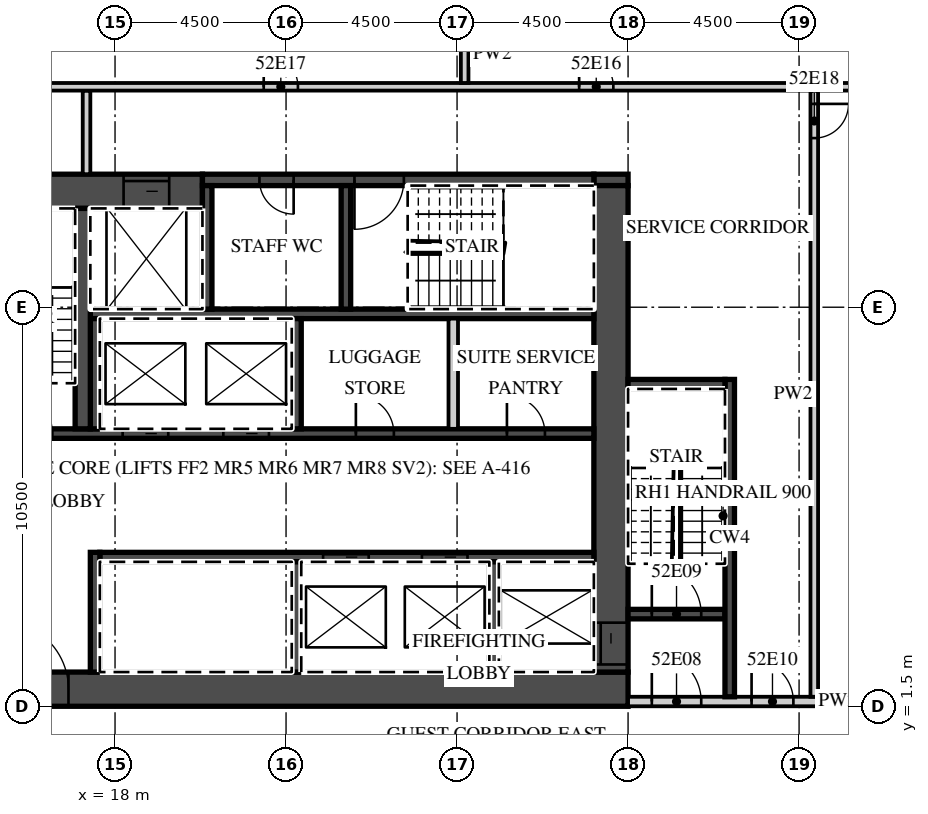
"""IFC4 building model, lengths in metres.
Left out: names, types, materials, properties, quantities, classifications, styles, units other than length and angle.
Written with IfcOpenShell. Run it as: python <this file> out.ifc"""

import sys

from ifc_helpers import new_model, si_unit, direction, frame, frame_2d, origin, place, context, subcontext, project, spatial, rectangle, extrude, element, fill, save


model = new_model("IFC4")
c1 = context("Model", 3, precision=1e-05, world=origin(), true_north=direction((0.0, 1.0)))
c2 = subcontext(c1, "Body", "Model", "MODEL_VIEW")
j1 = project(units=[si_unit("LENGTHUNIT", "METRE"), si_unit("PLANEANGLEUNIT", "RADIAN")], contexts=[c1])
p1 = place(None, origin())
s1 = spatial("IfcSite", under=j1, at=p1, CompositionType="ELEMENT")
p2 = place(p1, origin())
s2 = spatial("IfcBuilding", under=s1, at=p2, CompositionType="ELEMENT")
p3 = place(p2, frame((0.0, 0.0, 217.7)))
s3 = spatial("IfcBuildingStorey", under=s2, at=p3, CompositionType="ELEMENT", Elevation=217.7)
p4 = place(p3, frame((13.5, 1.95, 0.0), z_axis=(0.0, 0.0, 1.0), x_axis=(1.0, 0.0, 0.0)))
e1 = element("IfcWall", 1, at=p4, inside=s3, PredefinedType="SHEAR", context=c2, shape_type="SweptSolid", body=[
    extrude(rectangle(XDim=18.0, YDim=0.9, at=frame_2d((9.0, 0.0))), origin(), (0.0, 0.0, 1.0), 3.02),
])
p5 = place(p4, frame((1.475, 0.0, 0.0)))
e2 = element("IfcOpeningElement", 2, at=p5, cuts=e1, PredefinedType="OPENING", context=c2, shape_type="SweptSolid", body=[
    extrude(rectangle(XDim=1.8, YDim=2.1, at=frame_2d((0.9, 1.05))), frame((0.0, 0.46, 0.0), z_axis=(0.0, -1.0, 0.0), x_axis=(1.0, 0.0, 0.0)), (0.0, 0.0, 1.0), 0.92),
])
p6 = place(p3, frame((13.5, 15.05, 0.0), z_axis=(0.0, 0.0, 1.0), x_axis=(1.0, 0.0, 0.0)))
e3 = element("IfcWall", 3, at=p6, inside=s3, PredefinedType="SHEAR", context=c2, shape_type="SweptSolid", body=[
    extrude(rectangle(XDim=6.8, YDim=0.9, at=frame_2d((3.4, 0.0))), origin(), (0.0, 0.0, 1.0), 3.02),
])
p7 = place(p6, frame((4.725, 0.0, 0.0)))
e4 = element("IfcOpeningElement", 4, at=p7, cuts=e3, PredefinedType="OPENING", context=c2, shape_type="SweptSolid", body=[
    extrude(rectangle(XDim=1.2, YDim=2.1, at=frame_2d((0.6, 1.05))), frame((0.0, 0.46, 0.0), z_axis=(0.0, -1.0, 0.0), x_axis=(1.0, 0.0, 0.0)), (0.0, 0.0, 1.0), 0.92),
])
p8 = place(p3, frame((30.6, 15.35, 0.0), z_axis=(0.0, 0.0, 1.0), x_axis=(1.0, 0.0, 0.0)))
e5 = element("IfcWall", 5, at=p8, inside=s3, PredefinedType="SHEAR", context=c2, shape_type="SweptSolid", body=[
    extrude(rectangle(XDim=0.9, YDim=0.3, at=frame_2d((0.45, 0.0))), origin(), (0.0, 0.0, 1.0), 3.02),
])
p9 = place(p3, frame((20.3, 15.35, 0.0), z_axis=(0.0, 0.0, 1.0), x_axis=(1.0, 0.0, 0.0)))
e6 = element("IfcWall", 6, at=p9, inside=s3, PredefinedType="SHEAR", context=c2, shape_type="SweptSolid", body=[
    extrude(rectangle(XDim=10.3, YDim=0.3, at=frame_2d((5.15, 0.0))), origin(), (0.0, 0.0, 1.0), 3.02),
])
p10 = place(p9, frame((4.0, 0.0, 0.0)))
e7 = element("IfcOpeningElement", 7, at=p10, cuts=e6, PredefinedType="OPENING", context=c2, shape_type="SweptSolid", body=[
    extrude(rectangle(XDim=1.3, YDim=2.1, at=frame_2d((0.65, 1.05))), frame((0.0, 0.16, 0.0), z_axis=(0.0, -1.0, 0.0), x_axis=(1.0, 0.0, 0.0)), (0.0, 0.0, 1.0), 0.32),
])
p11 = place(p9, frame((1.5, 0.0, 0.0)))
e8 = element("IfcOpeningElement", 8, at=p11, cuts=e6, PredefinedType="OPENING", context=c2, shape_type="SweptSolid", body=[
    extrude(rectangle(XDim=0.9, YDim=2.1, at=frame_2d((0.45, 1.05))), frame((0.0, 0.16, 0.0), z_axis=(0.0, -1.0, 0.0), x_axis=(1.0, 0.0, 0.0)), (0.0, 0.0, 1.0), 0.32),
])
p12 = place(p3, frame((31.05, 2.4, 0.0), z_axis=(0.0, 0.0, 1.0), x_axis=(0.0, 1.0, 0.0)))
e9 = element("IfcWall", 9, at=p12, inside=s3, PredefinedType="SHEAR", context=c2, shape_type="SweptSolid", body=[
    extrude(rectangle(XDim=12.8, YDim=0.9, at=frame_2d((6.4, 0.0))), origin(), (0.0, 0.0, 1.0), 3.02),
])
p13 = place(p12, frame((0.2, 0.0, 0.0)))
e10 = element("IfcOpeningElement", 10, at=p13, cuts=e9, PredefinedType="OPENING", context=c2, shape_type="SweptSolid", body=[
    extrude(rectangle(XDim=1.1, YDim=2.1, at=frame_2d((0.55, 1.05))), frame((0.0, 0.46, 0.0), z_axis=(0.0, -1.0, 0.0), x_axis=(1.0, 0.0, 0.0)), (0.0, 0.0, 1.0), 0.92),
])
p14 = place(p3, frame((17.6, 5.425, 0.0), z_axis=(0.0, 0.0, 1.0), x_axis=(1.0, 0.0, 0.0)))
e11 = element("IfcWall", 11, at=p14, inside=s3, PredefinedType="SHEAR", context=c2, shape_type="SweptSolid", body=[
    extrude(rectangle(XDim=13.0, YDim=0.25, at=frame_2d((6.5, 0.0))), origin(), (0.0, 0.0, 1.0), 3.02),
])
p15 = place(p14, frame((8.475, 0.0, 0.0)))
e12 = element("IfcOpeningElement", 12, at=p15, cuts=e11, PredefinedType="OPENING", context=c2, shape_type="SweptSolid", body=[
    extrude(rectangle(XDim=1.2, YDim=2.1, at=frame_2d((0.6, 1.05))), frame((0.0, 0.135, 0.0), z_axis=(0.0, -1.0, 0.0), x_axis=(1.0, 0.0, 0.0)), (0.0, 0.0, 1.0), 0.27),
])
p16 = place(p14, frame((5.875, 0.0, 0.0)))
e13 = element("IfcOpeningElement", 13, at=p16, cuts=e11, PredefinedType="OPENING", context=c2, shape_type="SweptSolid", body=[
    extrude(rectangle(XDim=1.2, YDim=2.1, at=frame_2d((0.6, 1.05))), frame((0.0, 0.135, 0.0), z_axis=(0.0, -1.0, 0.0), x_axis=(1.0, 0.0, 0.0)), (0.0, 0.0, 1.0), 0.27),
])
p17 = place(p3, frame((17.475, 2.4, 0.0), z_axis=(0.0, 0.0, 1.0), x_axis=(0.0, 1.0, 0.0)))
e14 = element("IfcWall", 14, at=p17, inside=s3, PredefinedType="SHEAR", context=c2, shape_type="SweptSolid", body=[
    extrude(rectangle(XDim=3.15, YDim=0.25, at=frame_2d((1.575, 0.0))), origin(), (0.0, 0.0, 1.0), 3.02),
])
for number, where, z_axis, x_axis in (
    (15, (27.975, 2.4, 0.0), (0.0, 0.0, 1.0), (0.0, 1.0, 0.0)),
    (16, (22.775, 2.4, 0.0), (0.0, 0.0, 1.0), (0.0, 1.0, 0.0)),
):
    element("IfcWall", number, at=place(p3, frame(where, z_axis=z_axis, x_axis=x_axis)), inside=s3, PredefinedType="SHEAR", context=c2, shape_type="SweptSolid", body=[
        extrude(rectangle(XDim=2.9, YDim=0.25, at=frame_2d((1.45, 0.0))), origin(), (0.0, 0.0, 1.0), 3.02),
    ])
p18 = place(p3, frame((14.4, 8.675, 0.0), z_axis=(0.0, 0.0, 1.0), x_axis=(1.0, 0.0, 0.0)))
e17 = element("IfcWall", 17, at=p18, inside=s3, PredefinedType="SHEAR", context=c2, shape_type="SweptSolid", body=[
    extrude(rectangle(XDim=16.2, YDim=0.25, at=frame_2d((8.1, 0.0))), origin(), (0.0, 0.0, 1.0), 3.02),
])
p19 = place(p18, frame((6.45, 0.0, 0.0)))
e18 = element("IfcOpeningElement", 18, at=p19, cuts=e17, PredefinedType="OPENING", context=c2, shape_type="SweptSolid", body=[
    extrude(rectangle(XDim=1.2, YDim=2.1, at=frame_2d((0.6, 1.05))), frame((0.0, 0.135, 0.0), z_axis=(0.0, -1.0, 0.0), x_axis=(1.0, 0.0, 0.0)), (0.0, 0.0, 1.0), 0.27),
])
p20 = place(p18, frame((3.8, 0.0, 0.0)))
e19 = element("IfcOpeningElement", 19, at=p20, cuts=e17, PredefinedType="OPENING", context=c2, shape_type="SweptSolid", body=[
    extrude(rectangle(XDim=1.2, YDim=2.1, at=frame_2d((0.6, 1.05))), frame((0.0, 0.135, 0.0), z_axis=(0.0, -1.0, 0.0), x_axis=(1.0, 0.0, 0.0)), (0.0, 0.0, 1.0), 0.27),
])
p21 = place(p18, frame((0.65, 0.0, 0.0)))
e20 = element("IfcOpeningElement", 20, at=p21, cuts=e17, PredefinedType="OPENING", context=c2, shape_type="SweptSolid", body=[
    extrude(rectangle(XDim=1.3, YDim=2.1, at=frame_2d((0.65, 1.05))), frame((0.0, 0.135, 0.0), z_axis=(0.0, -1.0, 0.0), x_axis=(1.0, 0.0, 0.0)), (0.0, 0.0, 1.0), 0.27),
])
p22 = place(p18, frame((13.913, 0.0, 0.0)))
e21 = element("IfcOpeningElement", 21, at=p22, cuts=e17, PredefinedType="OPENING", context=c2, shape_type="SweptSolid", body=[
    extrude(rectangle(XDim=1.0, YDim=2.1, at=frame_2d((0.5, 1.05))), frame((0.0, 0.135, 0.0), z_axis=(0.0, -1.0, 0.0), x_axis=(1.0, 0.0, 0.0)), (0.0, 0.0, 1.0), 0.27),
])
p23 = place(p18, frame((9.938, 0.0, 0.0)))
e22 = element("IfcOpeningElement", 22, at=p23, cuts=e17, PredefinedType="OPENING", context=c2, shape_type="SweptSolid", body=[
    extrude(rectangle(XDim=1.0, YDim=2.1, at=frame_2d((0.5, 1.05))), frame((0.0, 0.135, 0.0), z_axis=(0.0, -1.0, 0.0), x_axis=(1.0, 0.0, 0.0)), (0.0, 0.0, 1.0), 0.27),
])
p24 = place(p3, frame((17.35, 11.825, 0.0), z_axis=(0.0, 0.0, 1.0), x_axis=(1.0, 0.0, 0.0)))
e23 = element("IfcWall", 23, at=p24, inside=s3, PredefinedType="SHEAR", context=c2, shape_type="SweptSolid", body=[
    extrude(rectangle(XDim=13.25, YDim=0.25, at=frame_2d((6.625, 0.0))), origin(), (0.0, 0.0, 1.0), 3.02),
])
for number, where, z_axis, x_axis in (
    (24, (17.475, 8.8, 0.0), (0.0, 0.0, 1.0), (0.0, 1.0, 0.0)),
    (25, (22.775, 8.8, 0.0), (0.0, 0.0, 1.0), (0.0, 1.0, 0.0)),
):
    element("IfcWall", number, at=place(p3, frame(where, z_axis=z_axis, x_axis=x_axis)), inside=s3, PredefinedType="SHEAR", context=c2, shape_type="SweptSolid", body=[
        extrude(rectangle(XDim=2.9, YDim=0.25, at=frame_2d((1.45, 0.0))), origin(), (0.0, 0.0, 1.0), 3.02),
    ])
p25 = place(p3, frame((26.9, 8.8, 0.0), z_axis=(0.0, 0.0, 1.0), x_axis=(0.0, 1.0, 0.0)))
e26 = element("IfcWall", 26, at=p25, inside=s3, PredefinedType="PARTITIONING", context=c2, shape_type="SweptSolid", body=[
    extrude(rectangle(XDim=2.9, YDim=0.25, at=frame_2d((1.45, 0.0))), origin(), (0.0, 0.0, 1.0), 3.02),
])
p26 = place(p3, frame((17.15, 8.8, 0.0), z_axis=(0.0, 0.0, 1.0), x_axis=(0.0, 1.0, 0.0)))
e27 = element("IfcWall", 27, at=p26, inside=s3, PredefinedType="SHEAR", context=c2, shape_type="SweptSolid", body=[
    extrude(rectangle(XDim=5.8, YDim=0.4, at=frame_2d((2.9, 0.0))), origin(), (0.0, 0.0, 1.0), 3.02),
])
for number, where, z_axis, x_axis in (
    (28, (20.425, 11.95, 0.0), (0.0, 0.0, 1.0), (0.0, 1.0, 0.0)),
    (29, (24.075, 11.95, 0.0), (0.0, 0.0, 1.0), (0.0, 1.0, 0.0)),
):
    element("IfcWall", number, at=place(p3, frame(where, z_axis=z_axis, x_axis=x_axis)), inside=s3, PredefinedType="SHEAR", context=c2, shape_type="SweptSolid", body=[
        extrude(rectangle(XDim=3.25, YDim=0.25, at=frame_2d((1.625, 0.0))), origin(), (0.0, 0.0, 1.0), 3.02),
    ])
p27 = place(p3, frame((31.5, 1.625, 0.0), z_axis=(0.0, 0.0, 1.0), x_axis=(1.0, 0.0, 0.0)))
e30 = element("IfcWall", 30, at=p27, inside=s3, PredefinedType="PARTITIONING", context=c2, shape_type="SweptSolid", body=[
    extrude(rectangle(XDim=11.04, YDim=0.25, at=frame_2d((5.52, 0.0))), origin(), (0.0, 0.0, 1.0), 3.02),
])
p28 = place(p27, frame((0.625, 0.0, 0.0)))
e31 = element("IfcOpeningElement", 31, at=p28, cuts=e30, PredefinedType="OPENING", context=c2, shape_type="SweptSolid", body=[
    extrude(rectangle(XDim=1.3, YDim=2.1, at=frame_2d((0.65, 1.05))), frame((0.0, 0.135, 0.0), z_axis=(0.0, -1.0, 0.0), x_axis=(1.0, 0.0, 0.0)), (0.0, 0.0, 1.0), 0.27),
])
p29 = place(p27, frame((3.25, 0.0, 0.0)))
e32 = element("IfcOpeningElement", 32, at=p29, cuts=e30, PredefinedType="OPENING", context=c2, shape_type="SweptSolid", body=[
    extrude(rectangle(XDim=1.1, YDim=2.1, at=frame_2d((0.55, 1.05))), frame((0.0, 0.135, 0.0), z_axis=(0.0, -1.0, 0.0), x_axis=(1.0, 0.0, 0.0)), (0.0, 0.0, 1.0), 0.27),
])
p30 = place(p3, frame((31.5, 3.925, 0.0), z_axis=(0.0, 0.0, 1.0), x_axis=(1.0, 0.0, 0.0)))
e33 = element("IfcWall", 33, at=p30, inside=s3, PredefinedType="SHEAR", context=c2, shape_type="SweptSolid", body=[
    extrude(rectangle(XDim=2.55, YDim=0.25, at=frame_2d((1.275, 0.0))), origin(), (0.0, 0.0, 1.0), 3.02),
])
p31 = place(p30, frame((0.625, 0.0, 0.0)))
e34 = element("IfcOpeningElement", 34, at=p31, cuts=e33, PredefinedType="OPENING", context=c2, shape_type="SweptSolid", body=[
    extrude(rectangle(XDim=1.3, YDim=2.1, at=frame_2d((0.65, 1.05))), frame((0.0, 0.135, 0.0), z_axis=(0.0, -1.0, 0.0), x_axis=(1.0, 0.0, 0.0)), (0.0, 0.0, 1.0), 0.27),
])
p32 = place(p3, frame((34.175, 1.75, 0.0), z_axis=(0.0, 0.0, 1.0), x_axis=(0.0, 1.0, 0.0)))
e35 = element("IfcWall", 35, at=p32, inside=s3, PredefinedType="SHEAR", context=c2, shape_type="SweptSolid", body=[
    extrude(rectangle(XDim=8.35, YDim=0.25, at=frame_2d((4.175, 0.0))), origin(), (0.0, 0.0, 1.0), 3.02),
])
p33 = place(p3, frame((31.5, 9.975, 0.0), z_axis=(0.0, 0.0, 1.0), x_axis=(1.0, 0.0, 0.0)))
e36 = element("IfcWall", 36, at=p33, inside=s3, PredefinedType="SHEAR", context=c2, shape_type="SweptSolid", body=[
    extrude(rectangle(XDim=2.55, YDim=0.25, at=frame_2d((1.275, 0.0))), origin(), (0.0, 0.0, 1.0), 3.02),
])
p34 = place(p3, frame((17.25, 15.5, 0.0), z_axis=(0.0, 0.0, 1.0), x_axis=(0.0, 1.0, 0.0)))
e37 = element("IfcWall", 37, at=p34, inside=s3, PredefinedType="PARTITIONING", context=c2, shape_type="SweptSolid", body=[
    extrude(rectangle(XDim=2.2, YDim=0.2, at=frame_2d((1.1, 0.0))), origin(), (0.0, 0.0, 1.0), 3.02),
])
p35 = place(p3, frame((36.4, 1.75, 0.0), z_axis=(0.0, 0.0, 1.0), x_axis=(0.0, 1.0, 0.0)))
e38 = element("IfcWall", 38, at=p35, inside=s3, PredefinedType="PARTITIONING", context=c2, shape_type="SweptSolid", body=[
    extrude(rectangle(XDim=15.95, YDim=0.2, at=frame_2d((7.975, 0.0))), origin(), (0.0, 0.0, 1.0), 3.02),
])
p36 = place(p35, frame((14.7, 0.0, 0.0)))
e39 = element("IfcOpeningElement", 39, at=p36, cuts=e38, PredefinedType="OPENING", context=c2, shape_type="SweptSolid", body=[
    extrude(rectangle(XDim=0.9, YDim=2.1, at=frame_2d((0.45, 1.05))), frame((0.0, 0.11, 0.0), z_axis=(0.0, -1.0, 0.0), x_axis=(1.0, 0.0, 0.0)), (0.0, 0.0, 1.0), 0.22),
])
p37 = place(p3, frame((13.6, 17.8, 0.0), z_axis=(0.0, 0.0, 1.0), x_axis=(1.0, 0.0, 0.0)))
e40 = element("IfcWall", 40, at=p37, inside=s3, PredefinedType="PARTITIONING", context=c2, shape_type="SweptSolid", body=[
    extrude(rectangle(XDim=28.657, YDim=0.2, at=frame_2d((14.329, 0.0))), origin(), (0.0, 0.0, 1.0), 3.02),
])
p38 = place(p37, frame((16.613, 0.0, 0.0)))
e41 = element("IfcOpeningElement", 41, at=p38, cuts=e40, PredefinedType="OPENING", context=c2, shape_type="SweptSolid", body=[
    extrude(rectangle(XDim=0.9, YDim=2.1, at=frame_2d((0.45, 1.05))), frame((0.0, 0.11, 0.0), z_axis=(0.0, -1.0, 0.0), x_axis=(1.0, 0.0, 0.0)), (0.0, 0.0, 1.0), 0.22),
])
p39 = place(p37, frame((8.312, 0.0, 0.0)))
e42 = element("IfcOpeningElement", 42, at=p39, cuts=e40, PredefinedType="OPENING", context=c2, shape_type="SweptSolid", body=[
    extrude(rectangle(XDim=0.9, YDim=2.1, at=frame_2d((0.45, 1.05))), frame((0.0, 0.11, 0.0), z_axis=(0.0, -1.0, 0.0), x_axis=(1.0, 0.0, 0.0)), (0.0, 0.0, 1.0), 0.22),
])
p40 = place(p3, frame((27.2, 17.9, 0.0), z_axis=(0.0, 0.0, 1.0), x_axis=(0.0, 1.0, 0.0)))
e43 = element("IfcWall", 43, at=p40, inside=s3, PredefinedType="PARTITIONING", context=c2, shape_type="SweptSolid", body=[
    extrude(rectangle(XDim=3.276, YDim=0.2, at=frame_2d((1.638, 0.0))), origin(), (0.0, 0.0, 1.0), 3.02),
])
p41 = place(p19, origin())
e44 = element("IfcDoor", 44, at=p41, inside=s3, OperationType="SLIDING_TO_LEFT", PredefinedType="DOOR", context=c2, shape_type="SweptSolid", body=[
    extrude(rectangle(XDim=1.2, YDim=2.1, at=frame_2d((0.6, 1.05))), frame((0.0, 0.025, 0.0), z_axis=(0.0, -1.0, 0.0), x_axis=(1.0, 0.0, 0.0)), (0.0, 0.0, 1.0), 0.05),
])
fill(e18, e44)
p42 = place(p20, origin())
e45 = element("IfcDoor", 45, at=p42, inside=s3, OperationType="SLIDING_TO_RIGHT", PredefinedType="DOOR", context=c2, shape_type="SweptSolid", body=[
    extrude(rectangle(XDim=1.2, YDim=2.1, at=frame_2d((0.6, 1.05))), frame((0.0, 0.025, 0.0), z_axis=(0.0, -1.0, 0.0), x_axis=(1.0, 0.0, 0.0)), (0.0, 0.0, 1.0), 0.05),
])
fill(e19, e45)
p43 = place(p15, origin())
e46 = element("IfcDoor", 46, at=p43, inside=s3, OperationType="SLIDING_TO_LEFT", PredefinedType="DOOR", context=c2, shape_type="SweptSolid", body=[
    extrude(rectangle(XDim=1.2, YDim=2.1, at=frame_2d((0.6, 1.05))), frame((0.0, 0.025, 0.0), z_axis=(0.0, -1.0, 0.0), x_axis=(1.0, 0.0, 0.0)), (0.0, 0.0, 1.0), 0.05),
])
fill(e12, e46)
p44 = place(p16, origin())
e47 = element("IfcDoor", 47, at=p44, inside=s3, OperationType="SLIDING_TO_RIGHT", PredefinedType="DOOR", context=c2, shape_type="SweptSolid", body=[
    extrude(rectangle(XDim=1.2, YDim=2.1, at=frame_2d((0.6, 1.05))), frame((0.0, 0.025, 0.0), z_axis=(0.0, -1.0, 0.0), x_axis=(1.0, 0.0, 0.0)), (0.0, 0.0, 1.0), 0.05),
])
fill(e13, e47)
p45 = place(p7, origin())
e48 = element("IfcDoor", 48, at=p45, inside=s3, OperationType="SLIDING_TO_LEFT", PredefinedType="DOOR", context=c2, shape_type="SweptSolid", body=[
    extrude(rectangle(XDim=1.2, YDim=2.1, at=frame_2d((0.6, 1.05))), frame((0.0, 0.025, 0.0), z_axis=(0.0, -1.0, 0.0), x_axis=(1.0, 0.0, 0.0)), (0.0, 0.0, 1.0), 0.05),
])
fill(e4, e48)
p46 = place(p13, origin())
e49 = element("IfcDoor", 49, at=p46, inside=s3, OperationType="SLIDING_TO_LEFT", PredefinedType="DOOR", context=c2, shape_type="SweptSolid", body=[
    extrude(rectangle(XDim=1.1, YDim=2.1, at=frame_2d((0.55, 1.05))), frame((0.0, 0.025, 0.0), z_axis=(0.0, -1.0, 0.0), x_axis=(1.0, 0.0, 0.0)), (0.0, 0.0, 1.0), 0.05),
])
fill(e10, e49)
p47 = place(p5, origin())
e50 = element("IfcDoor", 50, at=p47, inside=s3, OperationType="DOUBLE_DOOR_DOUBLE_SWING", PredefinedType="DOOR", context=c2, shape_type="SweptSolid", body=[
    extrude(rectangle(XDim=1.8, YDim=2.1, at=frame_2d((0.9, 1.05))), frame((0.0, 0.025, 0.0), z_axis=(0.0, -1.0, 0.0), x_axis=(1.0, 0.0, 0.0)), (0.0, 0.0, 1.0), 0.05),
])
fill(e2, e50)
p48 = place(p28, origin())
e51 = element("IfcDoor", 51, at=p48, inside=s3, OperationType="SINGLE_SWING_LEFT", PredefinedType="DOOR", context=c2, shape_type="SweptSolid", body=[
    extrude(rectangle(XDim=1.3, YDim=2.1, at=frame_2d((0.65, 1.05))), frame((0.0, 0.025, 0.0), z_axis=(0.0, -1.0, 0.0), x_axis=(1.0, 0.0, 0.0)), (0.0, 0.0, 1.0), 0.05),
])
fill(e31, e51)
p49 = place(p31, origin())
e52 = element("IfcDoor", 52, at=p49, inside=s3, OperationType="SINGLE_SWING_LEFT", PredefinedType="DOOR", context=c2, shape_type="SweptSolid", body=[
    extrude(rectangle(XDim=1.3, YDim=2.1, at=frame_2d((0.65, 1.05))), frame((0.0, 0.025, 0.0), z_axis=(0.0, -1.0, 0.0), x_axis=(1.0, 0.0, 0.0)), (0.0, 0.0, 1.0), 0.05),
])
fill(e34, e52)
p50 = place(p29, origin())
e53 = element("IfcDoor", 53, at=p50, inside=s3, OperationType="SINGLE_SWING_LEFT", PredefinedType="DOOR", context=c2, shape_type="SweptSolid", body=[
    extrude(rectangle(XDim=1.1, YDim=2.1, at=frame_2d((0.55, 1.05))), frame((0.0, 0.025, 0.0), z_axis=(0.0, -1.0, 0.0), x_axis=(1.0, 0.0, 0.0)), (0.0, 0.0, 1.0), 0.05),
])
fill(e32, e53)
p51 = place(p10, origin())
e54 = element("IfcDoor", 54, at=p51, inside=s3, OperationType="SINGLE_SWING_LEFT", PredefinedType="DOOR", context=c2, shape_type="SweptSolid", body=[
    extrude(rectangle(XDim=1.3, YDim=2.1, at=frame_2d((0.65, 1.05))), frame((0.0, 0.025, 0.0), z_axis=(0.0, -1.0, 0.0), x_axis=(1.0, 0.0, 0.0)), (0.0, 0.0, 1.0), 0.05),
])
fill(e7, e54)
p52 = place(p11, origin())
e55 = element("IfcDoor", 55, at=p52, inside=s3, OperationType="SINGLE_SWING_RIGHT", PredefinedType="DOOR", context=c2, shape_type="SweptSolid", body=[
    extrude(rectangle(XDim=0.9, YDim=2.1, at=frame_2d((0.45, 1.05))), frame((0.0, 0.025, 0.0), z_axis=(0.0, -1.0, 0.0), x_axis=(1.0, 0.0, 0.0)), (0.0, 0.0, 1.0), 0.05),
])
fill(e8, e55)
p53 = place(p22, origin())
e56 = element("IfcDoor", 56, at=p53, inside=s3, OperationType="SINGLE_SWING_LEFT", PredefinedType="DOOR", context=c2, shape_type="SweptSolid", body=[
    extrude(rectangle(XDim=1.0, YDim=2.1, at=frame_2d((0.5, 1.05))), frame((0.0, 0.025, 0.0), z_axis=(0.0, -1.0, 0.0), x_axis=(1.0, 0.0, 0.0)), (0.0, 0.0, 1.0), 0.05),
])
fill(e21, e56)
p54 = place(p23, origin())
e57 = element("IfcDoor", 57, at=p54, inside=s3, OperationType="SINGLE_SWING_LEFT", PredefinedType="DOOR", context=c2, shape_type="SweptSolid", body=[
    extrude(rectangle(XDim=1.0, YDim=2.1, at=frame_2d((0.5, 1.05))), frame((0.0, 0.025, 0.0), z_axis=(0.0, -1.0, 0.0), x_axis=(1.0, 0.0, 0.0)), (0.0, 0.0, 1.0), 0.05),
])
fill(e22, e57)
p55 = place(p38, origin())
e58 = element("IfcDoor", 58, at=p55, inside=s3, OperationType="SINGLE_SWING_LEFT", PredefinedType="DOOR", context=c2, shape_type="SweptSolid", body=[
    extrude(rectangle(XDim=0.9, YDim=2.1, at=frame_2d((0.45, 1.05))), frame((0.0, 0.025, 0.0), z_axis=(0.0, -1.0, 0.0), x_axis=(1.0, 0.0, 0.0)), (0.0, 0.0, 1.0), 0.05),
])
fill(e41, e58)
p56 = place(p39, origin())
e59 = element("IfcDoor", 59, at=p56, inside=s3, OperationType="SINGLE_SWING_LEFT", PredefinedType="DOOR", context=c2, shape_type="SweptSolid", body=[
    extrude(rectangle(XDim=0.9, YDim=2.1, at=frame_2d((0.45, 1.05))), frame((0.0, 0.025, 0.0), z_axis=(0.0, -1.0, 0.0), x_axis=(1.0, 0.0, 0.0)), (0.0, 0.0, 1.0), 0.05),
])
fill(e42, e59)
p57 = place(p36, origin())
e60 = element("IfcDoor", 60, at=p57, inside=s3, OperationType="SINGLE_SWING_RIGHT", PredefinedType="DOOR", context=c2, shape_type="SweptSolid", body=[
    extrude(rectangle(XDim=0.9, YDim=2.1, at=frame_2d((0.45, 1.05))), frame((0.0, 0.025, 0.0), z_axis=(0.0, -1.0, 0.0), x_axis=(1.0, 0.0, 0.0)), (0.0, 0.0, 1.0), 0.05),
])
fill(e39, e60)
save(model, sys.argv[1])
